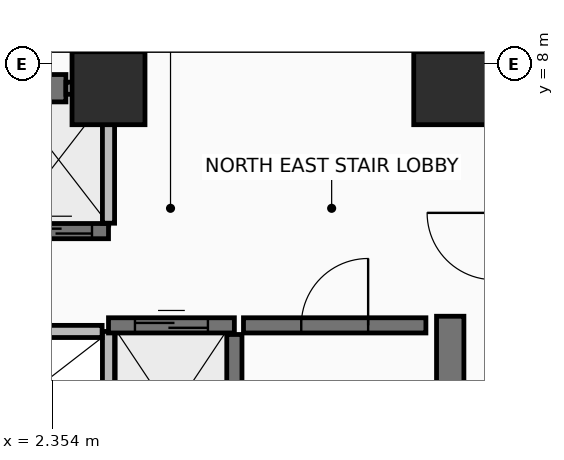
"""IFC4 building model, lengths in metres.
Left out: names, types, materials, properties, quantities, classifications, styles, units other than length and angle.
Written with IfcOpenShell. Run it as: python <this file> out.ifc"""

import sys

from ifc_helpers import new_model, si_unit, direction, frame, frame_2d, origin, origin_2d, place, context, subcontext, project, spatial, rectangle, extrude, element, fill, save


model = new_model("IFC4")
c1 = context("Model", 3, precision=1e-05, world=origin(), true_north=direction((0.0, 1.0)))
c2 = subcontext(c1, "Body", "Model", "MODEL_VIEW")
j1 = project(units=[si_unit("LENGTHUNIT", "METRE"), si_unit("PLANEANGLEUNIT", "RADIAN")], contexts=[c1])
p1 = place(None, origin())
s1 = spatial("IfcSite", under=j1, at=p1, CompositionType="ELEMENT")
p2 = place(p1, origin())
s2 = spatial("IfcBuilding", under=s1, at=p2, CompositionType="ELEMENT")
p3 = place(p2, frame((0.0, 0.0, 188.5)))
s3 = spatial("IfcBuildingStorey", under=s2, at=p3, CompositionType="ELEMENT", Elevation=188.5)
for number, where, z_axis, x_axis in (
    (1, (8.9, 7.6, 0.0), (0.0, 0.0, 1.0), (1.0, 0.0, 0.0)),
    (2, (3.28, 7.6, 0.0), (0.0, 0.0, 1.0), (1.0, 0.0, 0.0)),
):
    element("IfcColumn", number, at=place(p3, frame(where, z_axis=z_axis, x_axis=x_axis)), inside=s3, PredefinedType="COLUMN", context=c2, shape_type="SweptSolid", body=[
        extrude(rectangle(XDim=1.2, YDim=1.2, at=origin_2d()), origin(), (0.0, 0.0, 1.0), 3.6),
    ])
p4 = place(p3, frame((-2.8, 7.6, 0.0), z_axis=(0.0, 0.0, 1.0), x_axis=(1.0, 0.0, 0.0)))
e3 = element("IfcWall", 3, at=p4, inside=s3, PredefinedType="SHEAR", context=c2, shape_type="SweptSolid", body=[
    extrude(rectangle(XDim=5.38, YDim=0.45, at=frame_2d((2.69, 0.0))), origin(), (0.0, 0.0, 1.0), 3.42),
])
p5 = place(p3, frame((8.9, -6.85, 0.0), z_axis=(0.0, 0.0, 1.0), x_axis=(0.0, 1.0, 0.0)))
e4 = element("IfcWall", 4, at=p5, inside=s3, PredefinedType="SHEAR", context=c2, shape_type="SweptSolid", body=[
    extrude(rectangle(XDim=10.7, YDim=0.45, at=frame_2d((5.35, 0.0))), origin(), (0.0, 0.0, 1.0), 3.42),
])
p6 = place(p3, frame((5.35, -3.75, 0.0), z_axis=(0.0, 0.0, 1.0), x_axis=(0.0, 1.0, 0.0)))
e5 = element("IfcWall", 5, at=p6, inside=s3, PredefinedType="SHEAR", context=c2, shape_type="SweptSolid", body=[
    extrude(rectangle(XDim=7.3, YDim=0.25, at=frame_2d((3.65, 0.0))), origin(), (0.0, 0.0, 1.0), 3.42),
])
p7 = place(p3, frame((5.5, 3.7, 0.0), z_axis=(0.0, 0.0, 1.0), x_axis=(1.0, 0.0, 0.0)))
e6 = element("IfcWall", 6, at=p7, inside=s3, PredefinedType="SHEAR", context=c2, shape_type="SweptSolid", body=[
    extrude(rectangle(XDim=3.0, YDim=0.25, at=frame_2d((1.5, 0.0))), origin(), (0.0, 0.0, 1.0), 3.42),
])
p8 = place(p7, frame((0.95, 0.0, 0.0)))
e7 = element("IfcOpeningElement", 7, at=p8, cuts=e6, PredefinedType="OPENING", context=c2, shape_type="SweptSolid", body=[
    extrude(rectangle(XDim=1.1, YDim=2.15, at=frame_2d((0.55, 1.075))), frame((0.0, 0.135, 0.0), z_axis=(0.0, -1.0, 0.0), x_axis=(1.0, 0.0, 0.0)), (0.0, 0.0, 1.0), 0.27),
])
p9 = place(p3, frame((1.637, 5.25, 0.0), z_axis=(0.0, 0.0, 1.0), x_axis=(1.0, 0.0, 0.0)))
e8 = element("IfcWall", 8, at=p9, inside=s3, PredefinedType="SHEAR", context=c2, shape_type="SweptSolid", body=[
    extrude(rectangle(XDim=1.643, YDim=0.25, at=frame_2d((0.821, 0.0))), origin(), (0.0, 0.0, 1.0), 3.42),
])
p10 = place(p9, frame((0.271, 0.0, 0.0)))
e9 = element("IfcOpeningElement", 9, at=p10, cuts=e8, PredefinedType="OPENING", context=c2, shape_type="SweptSolid", body=[
    extrude(rectangle(XDim=1.1, YDim=2.2, at=frame_2d((0.55, 1.1))), frame((0.0, 0.135, 0.0), z_axis=(0.0, -1.0, 0.0), x_axis=(1.0, 0.0, 0.0)), (0.0, 0.0, 1.0), 0.27),
])
p11 = place(p3, frame((2.58, 7.6, 0.0), z_axis=(0.0, 0.0, 1.0), x_axis=(1.0, 0.0, 0.0)))
e10 = element("IfcWall", 10, at=p11, inside=s3, PredefinedType="PARTITIONING", context=c2, shape_type="SweptSolid", body=[
    extrude(rectangle(XDim=0.7, YDim=0.2, at=frame_2d((0.35, 0.0))), origin(), (0.0, 0.0, 1.0), 2.715),
])
p12 = place(p3, frame((3.28, 5.38, 0.0), z_axis=(0.0, 0.0, 1.0), x_axis=(0.0, 1.0, 0.0)))
e11 = element("IfcWall", 11, at=p12, inside=s3, PredefinedType="PARTITIONING", context=c2, shape_type="SweptSolid", body=[
    extrude(rectangle(XDim=2.115, YDim=0.2, at=frame_2d((1.058, 0.0))), origin(), (0.0, 0.0, 1.0), 2.715),
])
p13 = place(p3, frame((3.28, 1.8, 0.0), z_axis=(0.0, 0.0, 1.0), x_axis=(0.0, 1.0, 0.0)))
e12 = element("IfcWall", 12, at=p13, inside=s3, PredefinedType="PARTITIONING", context=c2, shape_type="SweptSolid", body=[
    extrude(rectangle(XDim=1.8, YDim=0.2, at=frame_2d((0.9, 0.0))), origin(), (0.0, 0.0, 1.0), 3.42),
])
p14 = place(p3, frame((1.13, 3.6, 0.0), z_axis=(0.0, 0.0, 1.0), x_axis=(1.0, 0.0, 0.0)))
e13 = element("IfcWall", 13, at=p14, inside=s3, PredefinedType="PARTITIONING", context=c2, shape_type="SweptSolid", body=[
    extrude(rectangle(XDim=2.045, YDim=0.2, at=frame_2d((1.022, 0.0))), origin(), (0.0, 0.0, 1.0), 2.715),
])
p15 = place(p3, frame((3.28, 3.7, 0.0), z_axis=(0.0, 0.0, 1.0), x_axis=(1.0, 0.0, 0.0)))
e14 = element("IfcWall", 14, at=p15, inside=s3, PredefinedType="SHEAR", context=c2, shape_type="SweptSolid", body=[
    extrude(rectangle(XDim=2.07, YDim=0.25, at=frame_2d((1.035, 0.0))), origin(), (0.0, 0.0, 1.0), 3.42),
])
p16 = place(p15, frame((0.435, 0.0, 0.0)))
e15 = element("IfcOpeningElement", 15, at=p16, cuts=e14, PredefinedType="OPENING", context=c2, shape_type="SweptSolid", body=[
    extrude(rectangle(XDim=1.2, YDim=2.2, at=frame_2d((0.6, 1.1))), frame((0.0, 0.135, 0.0), z_axis=(0.0, -1.0, 0.0), x_axis=(1.0, 0.0, 0.0)), (0.0, 0.0, 1.0), 0.27),
])
p17 = place(p8, frame((1.1, 0.0, 0.0), z_axis=(0.0, 0.0, 1.0), x_axis=(-1.0, 0.0, 0.0)))
e16 = element("IfcDoor", 16, at=p17, inside=s3, OperationType="SINGLE_SWING_LEFT", PredefinedType="DOOR", context=c2, shape_type="SweptSolid", body=[
    extrude(rectangle(XDim=1.1, YDim=2.15, at=frame_2d((0.55, 1.075))), frame((0.0, 0.025, 0.0), z_axis=(0.0, -1.0, 0.0), x_axis=(1.0, 0.0, 0.0)), (0.0, 0.0, 1.0), 0.05),
])
fill(e7, e16)
p18 = place(p10, origin())
e17 = element("IfcDoor", 17, at=p18, inside=s3, OperationType="SLIDING_TO_LEFT", PredefinedType="DOOR", context=c2, shape_type="SweptSolid", body=[
    extrude(rectangle(XDim=1.1, YDim=2.2, at=frame_2d((0.55, 1.1))), frame((0.0, 0.025, 0.0), z_axis=(0.0, -1.0, 0.0), x_axis=(1.0, 0.0, 0.0)), (0.0, 0.0, 1.0), 0.05),
])
fill(e9, e17)
p19 = place(p16, origin())
e18 = element("IfcDoor", 18, at=p19, inside=s3, OperationType="SLIDING_TO_RIGHT", PredefinedType="DOOR", context=c2, shape_type="SweptSolid", body=[
    extrude(rectangle(XDim=1.2, YDim=2.2, at=frame_2d((0.6, 1.1))), frame((0.0, 0.025, 0.0), z_axis=(0.0, -1.0, 0.0), x_axis=(1.0, 0.0, 0.0)), (0.0, 0.0, 1.0), 0.05),
])
fill(e15, e18)
save(model, sys.argv[1])
